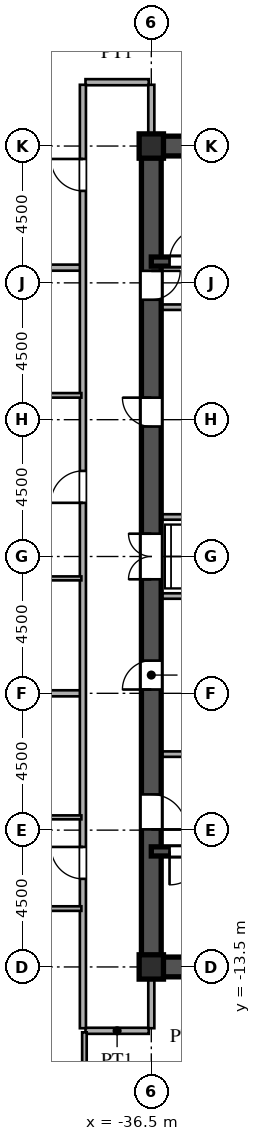
"""IFC4 building model, lengths in metres.
Left out: names, types, materials, properties, quantities, classifications, styles, units other than length and angle.
Written with IfcOpenShell. Run it as: python <this file> out.ifc"""

import sys

from ifc_helpers import new_model, si_unit, direction, frame, frame_2d, origin, origin_2d, place, context, subcontext, project, spatial, rectangle, i_section, extrude, source, transform, mapped, element, fill, save


model = new_model("IFC4")
c1 = context("Model", 3, precision=1e-05, world=origin(), true_north=direction((0.0, 1.0)))
c2 = subcontext(c1, "Body", "Model", "MODEL_VIEW")
j1 = project(units=[si_unit("LENGTHUNIT", "METRE"), si_unit("PLANEANGLEUNIT", "RADIAN")], contexts=[c1])
p1 = place(None, origin())
s1 = spatial("IfcSite", under=j1, at=p1, CompositionType="ELEMENT")
p2 = place(p1, origin())
s2 = spatial("IfcBuilding", under=s1, at=p2, CompositionType="ELEMENT")
p3 = place(p2, frame((0.0, 0.0, 62.1)))
s3 = spatial("IfcBuildingStorey", under=s2, at=p3, CompositionType="ELEMENT", Elevation=62.1)
m1 = source(origin(), c2, "Body", "SweptSolid", [
    extrude(i_section(OverallWidth=0.8, OverallDepth=0.8, WebThickness=0.032, FlangeThickness=0.05, at=origin_2d()), origin(), (0.0, 0.0, 1.0), 3.6),
])
for number, where, z_axis, x_axis in (
    (1, (-36.5, -13.5, 0.0), (0.0, 0.0, 1.0), (1.0, 0.0, 0.0)),
    (2, (-36.5, 13.5, 0.0), (0.0, 0.0, 1.0), (1.0, 0.0, 0.0)),
):
    element("IfcColumn", number, at=place(p3, frame(where, z_axis=z_axis, x_axis=x_axis)), inside=s3, PredefinedType="COLUMN", context=c2, shape_type="MappedRepresentation", body=[
        mapped(m1, transform((0.0, 0.0, 0.0), scale=1.0)),
    ])
for number, where, z_axis, x_axis in (
    (3, (-36.5, -13.5, 0.0), (0.0, 0.0, 1.0), (1.0, 0.0, 0.0)),
    (4, (-36.5, 13.5, 0.0), (0.0, 0.0, 1.0), (1.0, 0.0, 0.0)),
):
    element("IfcWall", number, at=place(p3, frame(where, z_axis=z_axis, x_axis=x_axis)), inside=s3, PredefinedType="SHEAR", context=c2, shape_type="SweptSolid", body=[
        extrude(rectangle(XDim=9.0, YDim=0.65, at=frame_2d((4.5, 0.0))), origin(), (0.0, 0.0, 1.0), 3.38),
    ])
p4 = place(p3, frame((-36.5, -13.65, 0.0), z_axis=(0.0, 0.0, 1.0), x_axis=(0.0, 1.0, 0.0)))
e5 = element("IfcWall", 5, at=p4, inside=s3, PredefinedType="SHEAR", context=c2, shape_type="SweptSolid", body=[
    extrude(rectangle(XDim=7.15, YDim=0.65, at=frame_2d((3.575, 0.0))), origin(), (0.0, 0.0, 1.0), 3.38),
])
p5 = place(p4, frame((4.675, 0.0, 0.0)))
e6 = element("IfcOpeningElement", 6, at=p5, cuts=e5, PredefinedType="OPENING", context=c2, shape_type="SweptSolid", body=[
    extrude(rectangle(XDim=1.15, YDim=2.2, at=frame_2d((0.575, 1.1))), frame((0.0, 0.335, 0.0), z_axis=(0.0, -1.0, 0.0), x_axis=(1.0, 0.0, 0.0)), (0.0, 0.0, 1.0), 0.67),
])
p6 = place(p3, frame((-36.5, -1.3, 0.0), z_axis=(0.0, 0.0, 1.0), x_axis=(0.0, 1.0, 0.0)))
e7 = element("IfcWall", 7, at=p6, inside=s3, PredefinedType="SHEAR", context=c2, shape_type="SweptSolid", body=[
    extrude(rectangle(XDim=2.6, YDim=0.65, at=frame_2d((1.3, 0.0))), origin(), (0.0, 0.0, 1.0), 3.38),
])
p7 = place(p6, frame((0.55, 0.0, 0.0)))
e8 = element("IfcOpeningElement", 8, at=p7, cuts=e7, PredefinedType="OPENING", context=c2, shape_type="SweptSolid", body=[
    extrude(rectangle(XDim=1.5, YDim=2.3, at=frame_2d((0.75, 1.15))), frame((0.0, 0.335, 0.0), z_axis=(0.0, -1.0, 0.0), x_axis=(1.0, 0.0, 0.0)), (0.0, 0.0, 1.0), 0.67),
])
p8 = place(p3, frame((-36.5, 8.2, 0.0), z_axis=(0.0, 0.0, 1.0), x_axis=(0.0, 1.0, 0.0)))
e9 = element("IfcWall", 9, at=p8, inside=s3, PredefinedType="SHEAR", context=c2, shape_type="SweptSolid", body=[
    extrude(rectangle(XDim=5.45, YDim=0.65, at=frame_2d((2.725, 0.0))), origin(), (0.0, 0.0, 1.0), 3.38),
])
p9 = place(p8, frame((0.245, 0.0, 0.0)))
e10 = element("IfcOpeningElement", 10, at=p9, cuts=e9, PredefinedType="OPENING", context=c2, shape_type="SweptSolid", body=[
    extrude(rectangle(XDim=0.95, YDim=2.15, at=frame_2d((0.475, 1.075))), frame((0.0, 0.335, 0.0), z_axis=(0.0, -1.0, 0.0), x_axis=(1.0, 0.0, 0.0)), (0.0, 0.0, 1.0), 0.67),
])
p10 = place(p3, frame((-36.5, -6.5, 0.0), z_axis=(0.0, 0.0, 1.0), x_axis=(0.0, 1.0, 0.0)))
e11 = element("IfcWall", 11, at=p10, inside=s3, PredefinedType="SHEAR", context=c2, shape_type="SweptSolid", body=[
    extrude(rectangle(XDim=5.2, YDim=0.65, at=frame_2d((2.6, 0.0))), origin(), (0.0, 0.0, 1.0), 3.38),
])
p11 = place(p10, frame((2.125, 0.0, 0.0)))
e12 = element("IfcOpeningElement", 12, at=p11, cuts=e11, PredefinedType="OPENING", context=c2, shape_type="SweptSolid", body=[
    extrude(rectangle(XDim=0.95, YDim=2.15, at=frame_2d((0.475, 1.075))), frame((0.0, 0.335, 0.0), z_axis=(0.0, -1.0, 0.0), x_axis=(1.0, 0.0, 0.0)), (0.0, 0.0, 1.0), 0.67),
])
p12 = place(p3, frame((-36.5, 1.3, 0.0), z_axis=(0.0, 0.0, 1.0), x_axis=(0.0, 1.0, 0.0)))
e13 = element("IfcWall", 13, at=p12, inside=s3, PredefinedType="SHEAR", context=c2, shape_type="SweptSolid", body=[
    extrude(rectangle(XDim=6.9, YDim=0.65, at=frame_2d((3.45, 0.0))), origin(), (0.0, 0.0, 1.0), 3.38),
])
p13 = place(p12, frame((2.975, 0.0, 0.0)))
e14 = element("IfcOpeningElement", 14, at=p13, cuts=e13, PredefinedType="OPENING", context=c2, shape_type="SweptSolid", body=[
    extrude(rectangle(XDim=0.95, YDim=2.15, at=frame_2d((0.475, 1.075))), frame((0.0, 0.335, 0.0), z_axis=(0.0, -1.0, 0.0), x_axis=(1.0, 0.0, 0.0)), (0.0, 0.0, 1.0), 0.67),
])
p14 = place(p3, frame((-36.5, -9.7, 0.0), z_axis=(0.0, 0.0, 1.0), x_axis=(1.0, 0.0, 0.0)))
e15 = element("IfcWall", 15, at=p14, inside=s3, PredefinedType="SHEAR", context=c2, shape_type="SweptSolid", body=[
    extrude(rectangle(XDim=9.0, YDim=0.3, at=frame_2d((4.5, 0.0))), origin(), (0.0, 0.0, 1.0), 3.38),
])
p15 = place(p14, frame((0.6, 0.0, 0.0)))
e16 = element("IfcOpeningElement", 16, at=p15, cuts=e15, PredefinedType="OPENING", context=c2, shape_type="SweptSolid", body=[
    extrude(rectangle(XDim=1.1, YDim=2.2, at=frame_2d((0.55, 1.1))), frame((0.0, 0.16, 0.0), z_axis=(0.0, -1.0, 0.0), x_axis=(1.0, 0.0, 0.0)), (0.0, 0.0, 1.0), 0.32),
])
p16 = place(p3, frame((-36.5, 9.7, 0.0), z_axis=(0.0, 0.0, 1.0), x_axis=(1.0, 0.0, 0.0)))
e17 = element("IfcWall", 17, at=p16, inside=s3, PredefinedType="SHEAR", context=c2, shape_type="SweptSolid", body=[
    extrude(rectangle(XDim=9.0, YDim=0.3, at=frame_2d((4.5, 0.0))), origin(), (0.0, 0.0, 1.0), 3.38),
])
p17 = place(p16, frame((0.6, 0.0, 0.0)))
e18 = element("IfcOpeningElement", 18, at=p17, cuts=e17, PredefinedType="OPENING", context=c2, shape_type="SweptSolid", body=[
    extrude(rectangle(XDim=1.1, YDim=2.2, at=frame_2d((0.55, 1.1))), frame((0.0, 0.16, 0.0), z_axis=(0.0, -1.0, 0.0), x_axis=(1.0, 0.0, 0.0)), (0.0, 0.0, 1.0), 0.32),
])
for number, where, z_axis, x_axis in (
    (19, (-36.15, -6.5, 0.0), (0.0, 0.0, 1.0), (1.0, 0.0, 0.0)),
    (20, (-36.15, 8.2, 0.0), (0.0, 0.0, 1.0), (1.0, 0.0, 0.0)),
):
    element("IfcWall", number, at=place(p3, frame(where, z_axis=z_axis, x_axis=x_axis)), inside=s3, PredefinedType="PARTITIONING", context=c2, shape_type="SweptSolid", body=[
        extrude(rectangle(XDim=5.7, YDim=0.18, at=frame_2d((2.85, 0.0))), origin(), (0.0, 0.0, 1.0), 3.38),
    ])
for number, where, z_axis, x_axis in (
    (21, (-36.15, -1.3, 0.0), (0.0, 0.0, 1.0), (1.0, 0.0, 0.0)),
    (22, (-36.15, 1.3, 0.0), (0.0, 0.0, 1.0), (1.0, 0.0, 0.0)),
):
    element("IfcWall", number, at=place(p3, frame(where, z_axis=z_axis, x_axis=x_axis)), inside=s3, PredefinedType="PARTITIONING", context=c2, shape_type="SweptSolid", body=[
        extrude(rectangle(XDim=2.95, YDim=0.18, at=frame_2d((1.475, 0.0))), origin(), (0.0, 0.0, 1.0), 3.38),
    ])
p18 = place(p3, frame((-38.665, -15.6, 0.0), z_axis=(0.0, 0.0, 1.0), x_axis=(1.0, 0.0, 0.0)))
e23 = element("IfcWall", 23, at=p18, inside=s3, PredefinedType="PARTITIONING", context=c2, shape_type="SweptSolid", body=[
    extrude(rectangle(XDim=2.08, YDim=0.2, at=frame_2d((1.04, 0.0))), origin(), (0.0, 0.0, 1.0), 3.38),
])
p19 = place(p3, frame((-43.8, -11.58, 0.0), z_axis=(0.0, 0.0, 1.0), x_axis=(1.0, 0.0, 0.0)))
e24 = element("IfcWall", 24, at=p19, inside=s3, PredefinedType="PARTITIONING", context=c2, shape_type="SweptSolid", body=[
    extrude(rectangle(XDim=5.0, YDim=0.15, at=frame_2d((2.5, 0.0))), origin(), (0.0, 0.0, 1.0), 3.38),
])
p20 = place(p19, frame((2.025, 0.0, 0.0)))
e25 = element("IfcOpeningElement", 25, at=p20, cuts=e24, PredefinedType="OPENING", context=c2, shape_type="SweptSolid", body=[
    extrude(rectangle(XDim=0.95, YDim=2.15, at=frame_2d((0.475, 1.075))), frame((0.0, 0.085, 0.0), z_axis=(0.0, -1.0, 0.0), x_axis=(1.0, 0.0, 0.0)), (0.0, 0.0, 1.0), 0.17),
])
p21 = place(p3, frame((-43.8, -8.58, 0.0), z_axis=(0.0, 0.0, 1.0), x_axis=(1.0, 0.0, 0.0)))
e26 = element("IfcWall", 26, at=p21, inside=s3, PredefinedType="PARTITIONING", context=c2, shape_type="SweptSolid", body=[
    extrude(rectangle(XDim=5.0, YDim=0.13, at=frame_2d((2.5, 0.0))), origin(), (0.0, 0.0, 1.0), 3.38),
])
p22 = place(p21, frame((2.06, 0.0, 0.0)))
e27 = element("IfcOpeningElement", 27, at=p22, cuts=e26, PredefinedType="OPENING", context=c2, shape_type="SweptSolid", body=[
    extrude(rectangle(XDim=0.88, YDim=2.1, at=frame_2d((0.44, 1.05))), frame((0.0, 0.075, 0.0), z_axis=(0.0, -1.0, 0.0), x_axis=(1.0, 0.0, 0.0)), (0.0, 0.0, 1.0), 0.15),
])
p23 = place(p3, frame((-54.52, -4.5, 0.0), z_axis=(0.0, 0.0, 1.0), x_axis=(1.0, 0.0, 0.0)))
e28 = element("IfcWall", 28, at=p23, inside=s3, PredefinedType="PARTITIONING", context=c2, shape_type="SweptSolid", body=[
    extrude(rectangle(XDim=15.69, YDim=0.2, at=frame_2d((7.845, 0.0))), origin(), (0.0, 0.0, 1.0), 2.68),
])
p24 = place(p3, frame((-43.8, -0.72, 0.0), z_axis=(0.0, 0.0, 1.0), x_axis=(1.0, 0.0, 0.0)))
e29 = element("IfcWall", 29, at=p24, inside=s3, PredefinedType="PARTITIONING", context=c2, shape_type="SweptSolid", body=[
    extrude(rectangle(XDim=5.0, YDim=0.13, at=frame_2d((2.5, 0.0))), origin(), (0.0, 0.0, 1.0), 3.38),
])
p25 = place(p24, frame((2.06, 0.0, 0.0)))
e30 = element("IfcOpeningElement", 30, at=p25, cuts=e29, PredefinedType="OPENING", context=c2, shape_type="SweptSolid", body=[
    extrude(rectangle(XDim=0.88, YDim=2.1, at=frame_2d((0.44, 1.05))), frame((0.0, 0.075, 0.0), z_axis=(0.0, -1.0, 0.0), x_axis=(1.0, 0.0, 0.0)), (0.0, 0.0, 1.0), 0.15),
])
p26 = place(p3, frame((-43.8, 5.3, 0.0), z_axis=(0.0, 0.0, 1.0), x_axis=(1.0, 0.0, 0.0)))
e31 = element("IfcWall", 31, at=p26, inside=s3, PredefinedType="PARTITIONING", context=c2, shape_type="SweptSolid", body=[
    extrude(rectangle(XDim=5.0, YDim=0.15, at=frame_2d((2.5, 0.0))), origin(), (0.0, 0.0, 1.0), 3.38),
])
p27 = place(p26, frame((2.025, 0.0, 0.0)))
e32 = element("IfcOpeningElement", 32, at=p27, cuts=e31, PredefinedType="OPENING", context=c2, shape_type="SweptSolid", body=[
    extrude(rectangle(XDim=0.95, YDim=2.15, at=frame_2d((0.475, 1.075))), frame((0.0, 0.085, 0.0), z_axis=(0.0, -1.0, 0.0), x_axis=(1.0, 0.0, 0.0)), (0.0, 0.0, 1.0), 0.17),
])
p28 = place(p3, frame((-66.568, 9.5, 0.0), z_axis=(0.0, 0.0, 1.0), x_axis=(1.0, 0.0, 0.0)))
e33 = element("IfcWall", 33, at=p28, inside=s3, PredefinedType="PARTITIONING", context=c2, shape_type="SweptSolid", body=[
    extrude(rectangle(XDim=27.738, YDim=0.2, at=frame_2d((13.869, 0.0))), origin(), (0.0, 0.0, 1.0), 3.38),
])
p29 = place(p3, frame((-38.665, 15.6, 0.0), z_axis=(0.0, 0.0, 1.0), x_axis=(1.0, 0.0, 0.0)))
e34 = element("IfcWall", 34, at=p29, inside=s3, PredefinedType="PARTITIONING", context=c2, shape_type="SweptSolid", body=[
    extrude(rectangle(XDim=2.08, YDim=0.2, at=frame_2d((1.04, 0.0))), origin(), (0.0, 0.0, 1.0), 3.38),
])
p30 = place(p3, frame((-38.75, -15.515, 0.0), z_axis=(0.0, 0.0, 1.0), x_axis=(0.0, 1.0, 0.0)))
e35 = element("IfcWall", 35, at=p30, inside=s3, PredefinedType="PARTITIONING", context=c2, shape_type="SweptSolid", body=[
    extrude(rectangle(XDim=31.03, YDim=0.2, at=frame_2d((15.515, 0.0))), origin(), (0.0, 0.0, 1.0), 3.38),
])
p31 = place(p30, frame((4.913, 0.0, 0.0)))
e36 = element("IfcOpeningElement", 36, at=p31, cuts=e35, PredefinedType="OPENING", context=c2, shape_type="SweptSolid", body=[
    extrude(rectangle(XDim=1.05, YDim=2.25, at=frame_2d((0.525, 1.125))), frame((0.0, 0.11, 0.0), z_axis=(0.0, -1.0, 0.0), x_axis=(1.0, 0.0, 0.0)), (0.0, 0.0, 1.0), 0.22),
])
p32 = place(p30, frame((17.28, 0.0, 0.0)))
e37 = element("IfcOpeningElement", 37, at=p32, cuts=e35, PredefinedType="OPENING", context=c2, shape_type="SweptSolid", body=[
    extrude(rectangle(XDim=1.05, YDim=2.25, at=frame_2d((0.525, 1.125))), frame((0.0, 0.11, 0.0), z_axis=(0.0, -1.0, 0.0), x_axis=(1.0, 0.0, 0.0)), (0.0, 0.0, 1.0), 0.22),
])
p33 = place(p30, frame((27.54, 0.0, 0.0)))
e38 = element("IfcOpeningElement", 38, at=p33, cuts=e35, PredefinedType="OPENING", context=c2, shape_type="SweptSolid", body=[
    extrude(rectangle(XDim=1.05, YDim=2.25, at=frame_2d((0.525, 1.125))), frame((0.0, 0.11, 0.0), z_axis=(0.0, -1.0, 0.0), x_axis=(1.0, 0.0, 0.0)), (0.0, 0.0, 1.0), 0.22),
])
p34 = place(p3, frame((-38.7, -22.07, 0.0), z_axis=(0.0, 0.0, 1.0), x_axis=(0.0, 1.0, 0.0)))
e39 = element("IfcWall", 39, at=p34, inside=s3, PredefinedType="PARTITIONING", context=c2, shape_type="SweptSolid", body=[
    extrude(rectangle(XDim=6.42, YDim=0.15, at=frame_2d((3.21, 0.0))), origin(), (0.0, 0.0, 1.0), 3.38),
])
p35 = place(p34, frame((0.827, 0.0, 0.0)))
e40 = element("IfcOpeningElement", 40, at=p35, cuts=e39, PredefinedType="OPENING", context=c2, shape_type="SweptSolid", body=[
    extrude(rectangle(XDim=0.95, YDim=2.15, at=frame_2d((0.475, 1.075))), frame((0.0, 0.085, 0.0), z_axis=(0.0, -1.0, 0.0), x_axis=(1.0, 0.0, 0.0)), (0.0, 0.0, 1.0), 0.17),
])
for number, where, z_axis, x_axis in (
    (41, (-36.5, -15.515, 0.0), (0.0, 0.0, 1.0), (0.0, 1.0, 0.0)),
    (42, (-36.5, 13.83, 0.0), (0.0, 0.0, 1.0), (0.0, 1.0, 0.0)),
):
    element("IfcWall", number, at=place(p3, frame(where, z_axis=z_axis, x_axis=x_axis)), inside=s3, PredefinedType="PARTITIONING", context=c2, shape_type="SweptSolid", body=[
        extrude(rectangle(XDim=1.685, YDim=0.2, at=frame_2d((0.842, 0.0))), origin(), (0.0, 0.0, 1.0), 2.68),
    ])
m2 = source(origin(), c2, "Body", "SweptSolid", [
    extrude(rectangle(XDim=1.15, YDim=2.2, at=frame_2d((0.575, 1.1))), frame((0.0, 0.025, 0.0), z_axis=(0.0, -1.0, 0.0), x_axis=(1.0, 0.0, 0.0)), (0.0, 0.0, 1.0), 0.05),
])
p36 = place(p5, frame((1.15, 0.0, 0.0), z_axis=(0.0, 0.0, 1.0), x_axis=(-1.0, 0.0, 0.0)))
e43 = element("IfcDoor", 43, at=p36, inside=s3, OperationType="SINGLE_SWING_LEFT", PredefinedType="DOOR", context=c2, shape_type="MappedRepresentation", body=[
    mapped(m2, transform((0.0, 0.0, 0.0), scale=1.0)),
])
fill(e6, e43)
m3 = source(origin(), c2, "Body", "SweptSolid", [
    extrude(rectangle(XDim=1.5, YDim=2.3, at=frame_2d((0.75, 1.15))), frame((0.0, 0.025, 0.0), z_axis=(0.0, -1.0, 0.0), x_axis=(1.0, 0.0, 0.0)), (0.0, 0.0, 1.0), 0.05),
])
p37 = place(p7, origin())
e44 = element("IfcDoor", 44, at=p37, inside=s3, OperationType="DOUBLE_SWING_LEFT", PredefinedType="DOOR", context=c2, shape_type="MappedRepresentation", body=[
    mapped(m3, transform((0.0, 0.0, 0.0), scale=1.0)),
])
fill(e8, e44)
m4 = source(origin(), c2, "Body", "SweptSolid", [
    extrude(rectangle(XDim=0.95, YDim=2.15, at=frame_2d((0.475, 1.075))), frame((0.0, 0.025, 0.0), z_axis=(0.0, -1.0, 0.0), x_axis=(1.0, 0.0, 0.0)), (0.0, 0.0, 1.0), 0.05),
])
p38 = place(p9, frame((0.95, 0.0, 0.0), z_axis=(0.0, 0.0, 1.0), x_axis=(-1.0, 0.0, 0.0)))
e45 = element("IfcDoor", 45, at=p38, inside=s3, OperationType="SINGLE_SWING_RIGHT", PredefinedType="DOOR", context=c2, shape_type="MappedRepresentation", body=[
    mapped(m4, transform((0.0, 0.0, 0.0), scale=1.0)),
])
fill(e10, e45)
p39 = place(p11, origin())
e46 = element("IfcDoor", 46, at=p39, inside=s3, OperationType="SINGLE_SWING_LEFT", PredefinedType="DOOR", context=c2, shape_type="MappedRepresentation", body=[
    mapped(m4, transform((0.0, 0.0, 0.0), scale=1.0)),
])
fill(e12, e46)
p40 = place(p13, origin())
e47 = element("IfcDoor", 47, at=p40, inside=s3, OperationType="SINGLE_SWING_RIGHT", PredefinedType="DOOR", context=c2, shape_type="MappedRepresentation", body=[
    mapped(m4, transform((0.0, 0.0, 0.0), scale=1.0)),
])
fill(e14, e47)
m5 = source(origin(), c2, "Body", "SweptSolid", [
    extrude(rectangle(XDim=1.1, YDim=2.2, at=frame_2d((0.55, 1.1))), frame((0.0, 0.025, 0.0), z_axis=(0.0, -1.0, 0.0), x_axis=(1.0, 0.0, 0.0)), (0.0, 0.0, 1.0), 0.05),
])
p41 = place(p15, frame((1.1, 0.0, 0.0), z_axis=(0.0, 0.0, 1.0), x_axis=(-1.0, 0.0, 0.0)))
e48 = element("IfcDoor", 48, at=p41, inside=s3, OperationType="SINGLE_SWING_LEFT", PredefinedType="DOOR", context=c2, shape_type="MappedRepresentation", body=[
    mapped(m5, transform((0.0, 0.0, 0.0), scale=1.0)),
])
fill(e16, e48)
p42 = place(p17, origin())
e49 = element("IfcDoor", 49, at=p42, inside=s3, OperationType="SINGLE_SWING_RIGHT", PredefinedType="DOOR", context=c2, shape_type="MappedRepresentation", body=[
    mapped(m5, transform((0.0, 0.0, 0.0), scale=1.0)),
])
fill(e18, e49)
m6 = source(origin(), c2, "Body", "SweptSolid", [
    extrude(rectangle(XDim=1.05, YDim=2.25, at=frame_2d((0.525, 1.125))), frame((0.0, 0.025, 0.0), z_axis=(0.0, -1.0, 0.0), x_axis=(1.0, 0.0, 0.0)), (0.0, 0.0, 1.0), 0.05),
])
p43 = place(p31, origin())
e50 = element("IfcDoor", 50, at=p43, inside=s3, OperationType="SINGLE_SWING_RIGHT", PredefinedType="DOOR", context=c2, shape_type="MappedRepresentation", body=[
    mapped(m6, transform((0.0, 0.0, 0.0), scale=1.0)),
])
fill(e36, e50)
p44 = place(p32, origin())
e51 = element("IfcDoor", 51, at=p44, inside=s3, OperationType="SINGLE_SWING_LEFT", PredefinedType="DOOR", context=c2, shape_type="MappedRepresentation", body=[
    mapped(m6, transform((0.0, 0.0, 0.0), scale=1.0)),
])
fill(e37, e51)
p45 = place(p33, origin())
e52 = element("IfcDoor", 52, at=p45, inside=s3, OperationType="SINGLE_SWING_RIGHT", PredefinedType="DOOR", context=c2, shape_type="MappedRepresentation", body=[
    mapped(m6, transform((0.0, 0.0, 0.0), scale=1.0)),
])
fill(e38, e52)
save(model, sys.argv[1])
